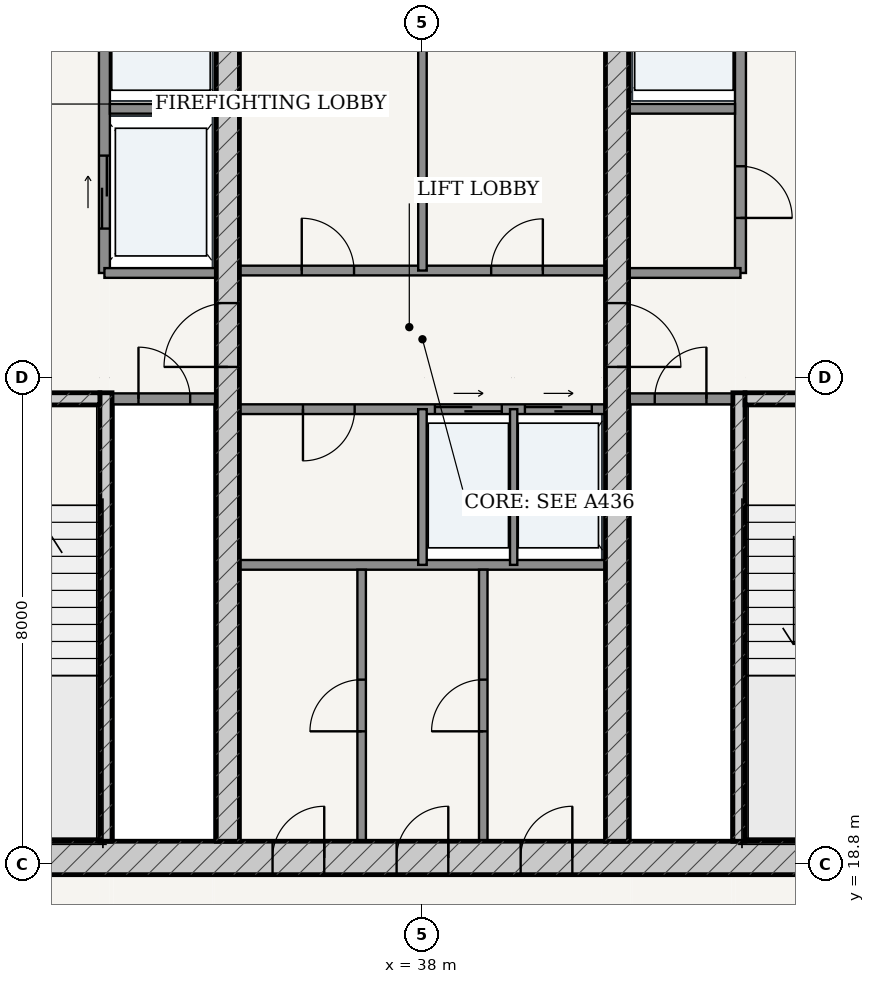
"""IFC4 building model, lengths in metres.
Left out: names, types, materials, properties, quantities, classifications, styles, units other than length and angle.
Written with IfcOpenShell. Run it as: python <this file> out.ifc"""

import sys

from ifc_helpers import new_model, si_unit, direction, frame, frame_2d, origin, place, context, subcontext, project, spatial, rectangle, extrude, source, transform, mapped, element, fill, save


model = new_model("IFC4")
c1 = context("Model", 3, precision=1e-05, world=origin(), true_north=direction((-0.2419218956, 0.970295726276)))
c2 = subcontext(c1, "Body", "Model", "MODEL_VIEW")
j1 = project(units=[si_unit("LENGTHUNIT", "METRE"), si_unit("PLANEANGLEUNIT", "RADIAN")], contexts=[c1])
p1 = place(None, origin())
s1 = spatial("IfcSite", under=j1, at=p1, CompositionType="ELEMENT")
p2 = place(p1, origin())
s2 = spatial("IfcBuilding", under=s1, at=p2, CompositionType="ELEMENT")
p3 = place(p2, frame((0.0, 0.0, 270.7)))
s3 = spatial("IfcBuildingStorey", under=s2, at=p3, CompositionType="ELEMENT", Elevation=270.7)
p4 = place(p3, frame((28.825, 18.9, 0.0), z_axis=(0.0, 0.0, 1.0), x_axis=(1.0, 0.0, 0.0)))
e1 = element("IfcWall", 1, at=p4, inside=s3, PredefinedType="SHEAR", context=c2, shape_type="SweptSolid", body=[
    extrude(rectangle(XDim=18.35, YDim=0.55, at=frame_2d((9.175, 0.0))), origin(), (0.0, 0.0, 1.0), 3.49),
])
p5 = place(p4, frame((6.71, 0.0, 0.0)))
e2 = element("IfcOpeningElement", 2, at=p5, cuts=e1, PredefinedType="OPENING", context=c2, shape_type="SweptSolid", body=[
    extrude(rectangle(XDim=0.85, YDim=2.1, at=frame_2d((0.425, 1.05))), frame((0.0, 0.285, 0.0), z_axis=(0.0, -1.0, 0.0), x_axis=(1.0, 0.0, 0.0)), (0.0, 0.0, 1.0), 0.57),
])
p6 = place(p4, frame((8.75, 0.0, 0.0)))
e3 = element("IfcOpeningElement", 3, at=p6, cuts=e1, PredefinedType="OPENING", context=c2, shape_type="SweptSolid", body=[
    extrude(rectangle(XDim=0.85, YDim=2.1, at=frame_2d((0.425, 1.05))), frame((0.0, 0.285, 0.0), z_axis=(0.0, -1.0, 0.0), x_axis=(1.0, 0.0, 0.0)), (0.0, 0.0, 1.0), 0.57),
])
p7 = place(p4, frame((10.79, 0.0, 0.0)))
e4 = element("IfcOpeningElement", 4, at=p7, cuts=e1, PredefinedType="OPENING", context=c2, shape_type="SweptSolid", body=[
    extrude(rectangle(XDim=0.85, YDim=2.1, at=frame_2d((0.425, 1.05))), frame((0.0, 0.285, 0.0), z_axis=(0.0, -1.0, 0.0), x_axis=(1.0, 0.0, 0.0)), (0.0, 0.0, 1.0), 0.57),
])
p8 = place(p3, frame((32.795, 19.175, 0.0), z_axis=(0.0, 0.0, 1.0), x_axis=(0.0, 1.0, 0.0)))
e5 = element("IfcWall", 5, at=p8, inside=s3, PredefinedType="SOLIDWALL", context=c2, shape_type="SweptSolid", body=[
    extrude(rectangle(XDim=7.375, YDim=0.2, at=frame_2d((3.688, 0.0))), origin(), (0.0, 0.0, 1.0), 3.49),
])
p9 = place(p3, frame((29.375, 26.45, 0.0), z_axis=(0.0, 0.0, 1.0), x_axis=(1.0, 0.0, 0.0)))
e6 = element("IfcWall", 6, at=p9, inside=s3, PredefinedType="SOLIDWALL", context=c2, shape_type="SweptSolid", body=[
    extrude(rectangle(XDim=3.32, YDim=0.2, at=frame_2d((1.66, 0.0))), origin(), (0.0, 0.0, 1.0), 3.49),
])
p10 = place(p9, frame((1.185, 0.0, 0.0)))
e7 = element("IfcOpeningElement", 7, at=p10, cuts=e6, PredefinedType="OPENING", context=c2, shape_type="SweptSolid", body=[
    extrude(rectangle(XDim=0.95, YDim=2.15, at=frame_2d((0.475, 1.075))), frame((0.0, 0.11, 0.0), z_axis=(0.0, -1.0, 0.0), x_axis=(1.0, 0.0, 0.0)), (0.0, 0.0, 1.0), 0.22),
])
p11 = place(p3, frame((43.205, 19.175, 0.0), z_axis=(0.0, 0.0, 1.0), x_axis=(0.0, 1.0, 0.0)))
e8 = element("IfcWall", 8, at=p11, inside=s3, PredefinedType="SOLIDWALL", context=c2, shape_type="SweptSolid", body=[
    extrude(rectangle(XDim=7.375, YDim=0.2, at=frame_2d((3.688, 0.0))), origin(), (0.0, 0.0, 1.0), 3.49),
])
p12 = place(p3, frame((43.305, 26.45, 0.0), z_axis=(0.0, 0.0, 1.0), x_axis=(1.0, 0.0, 0.0)))
e9 = element("IfcWall", 9, at=p12, inside=s3, PredefinedType="SOLIDWALL", context=c2, shape_type="SweptSolid", body=[
    extrude(rectangle(XDim=3.32, YDim=0.2, at=frame_2d((1.66, 0.0))), origin(), (0.0, 0.0, 1.0), 3.49),
])
p13 = place(p12, frame((1.185, 0.0, 0.0)))
e10 = element("IfcOpeningElement", 10, at=p13, cuts=e9, PredefinedType="OPENING", context=c2, shape_type="SweptSolid", body=[
    extrude(rectangle(XDim=0.95, YDim=2.15, at=frame_2d((0.475, 1.075))), frame((0.0, 0.11, 0.0), z_axis=(0.0, -1.0, 0.0), x_axis=(1.0, 0.0, 0.0)), (0.0, 0.0, 1.0), 0.22),
])
p14 = place(p3, frame((34.8, 19.175, 0.0), z_axis=(0.0, 0.0, 1.0), x_axis=(0.0, 1.0, 0.0)))
e11 = element("IfcWall", 11, at=p14, inside=s3, PredefinedType="SHEAR", context=c2, shape_type="SweptSolid", body=[
    extrude(rectangle(XDim=15.25, YDim=0.38, at=frame_2d((7.625, 0.0))), origin(), (0.0, 0.0, 1.0), 3.49),
])
p15 = place(p14, frame((7.8, 0.0, 0.0)))
e12 = element("IfcOpeningElement", 12, at=p15, cuts=e11, PredefinedType="OPENING", context=c2, shape_type="SweptSolid", body=[
    extrude(rectangle(XDim=1.05, YDim=2.15, at=frame_2d((0.525, 1.075))), frame((0.0, 0.2, 0.0), z_axis=(0.0, -1.0, 0.0), x_axis=(1.0, 0.0, 0.0)), (0.0, 0.0, 1.0), 0.4),
])
p16 = place(p3, frame((41.2, 19.175, 0.0), z_axis=(0.0, 0.0, 1.0), x_axis=(0.0, 1.0, 0.0)))
e13 = element("IfcWall", 13, at=p16, inside=s3, PredefinedType="SHEAR", context=c2, shape_type="SweptSolid", body=[
    extrude(rectangle(XDim=15.25, YDim=0.38, at=frame_2d((7.625, 0.0))), origin(), (0.0, 0.0, 1.0), 3.49),
])
p17 = place(p16, frame((7.8, 0.0, 0.0)))
e14 = element("IfcOpeningElement", 14, at=p17, cuts=e13, PredefinedType="OPENING", context=c2, shape_type="SweptSolid", body=[
    extrude(rectangle(XDim=1.05, YDim=2.15, at=frame_2d((0.525, 1.075))), frame((0.0, 0.2, 0.0), z_axis=(0.0, -1.0, 0.0), x_axis=(1.0, 0.0, 0.0)), (0.0, 0.0, 1.0), 0.4),
])
p18 = place(p3, frame((32.9, 26.45, 0.0), z_axis=(0.0, 0.0, 1.0), x_axis=(1.0, 0.0, 0.0)))
e15 = element("IfcWall", 15, at=p18, inside=s3, PredefinedType="PARTITIONING", context=c2, shape_type="SweptSolid", body=[
    extrude(rectangle(XDim=1.71, YDim=0.18, at=frame_2d((0.855, 0.0))), origin(), (0.0, 0.0, 1.0), 3.49),
])
p19 = place(p18, frame((0.43, 0.0, 0.0)))
e16 = element("IfcOpeningElement", 16, at=p19, cuts=e15, PredefinedType="OPENING", context=c2, shape_type="SweptSolid", body=[
    extrude(rectangle(XDim=0.85, YDim=2.1, at=frame_2d((0.425, 1.05))), frame((0.0, 0.1, 0.0), z_axis=(0.0, -1.0, 0.0), x_axis=(1.0, 0.0, 0.0)), (0.0, 0.0, 1.0), 0.2),
])
p20 = place(p3, frame((41.39, 26.45, 0.0), z_axis=(0.0, 0.0, 1.0), x_axis=(1.0, 0.0, 0.0)))
e17 = element("IfcWall", 17, at=p20, inside=s3, PredefinedType="PARTITIONING", context=c2, shape_type="SweptSolid", body=[
    extrude(rectangle(XDim=1.71, YDim=0.18, at=frame_2d((0.855, 0.0))), origin(), (0.0, 0.0, 1.0), 3.49),
])
p21 = place(p20, frame((0.43, 0.0, 0.0)))
e18 = element("IfcOpeningElement", 18, at=p21, cuts=e17, PredefinedType="OPENING", context=c2, shape_type="SweptSolid", body=[
    extrude(rectangle(XDim=0.85, YDim=2.1, at=frame_2d((0.425, 1.05))), frame((0.0, 0.1, 0.0), z_axis=(0.0, -1.0, 0.0), x_axis=(1.0, 0.0, 0.0)), (0.0, 0.0, 1.0), 0.2),
])
p22 = place(p3, frame((32.77, 28.52, 0.0), z_axis=(0.0, 0.0, 1.0), x_axis=(0.0, 1.0, 0.0)))
e19 = element("IfcWall", 19, at=p22, inside=s3, PredefinedType="PARTITIONING", context=c2, shape_type="SweptSolid", body=[
    extrude(rectangle(XDim=5.905, YDim=0.18, at=frame_2d((2.953, 0.0))), origin(), (0.0, 0.0, 1.0), 3.49),
])
p23 = place(p22, frame((3.655, 0.0, 0.0)))
e20 = element("IfcOpeningElement", 20, at=p23, cuts=e19, PredefinedType="OPENING", context=c2, shape_type="SweptSolid", body=[
    extrude(rectangle(XDim=1.15, YDim=2.2, at=frame_2d((0.575, 1.1))), frame((0.0, 0.1, 0.0), z_axis=(0.0, -1.0, 0.0), x_axis=(1.0, 0.0, 0.0)), (0.0, 0.0, 1.0), 0.2),
])
p24 = place(p22, frame((0.73, 0.0, 0.0)))
e21 = element("IfcOpeningElement", 21, at=p24, cuts=e19, PredefinedType="OPENING", context=c2, shape_type="SweptSolid", body=[
    extrude(rectangle(XDim=1.2, YDim=2.25, at=frame_2d((0.6, 1.125))), frame((0.0, 0.1, 0.0), z_axis=(0.0, -1.0, 0.0), x_axis=(1.0, 0.0, 0.0)), (0.0, 0.0, 1.0), 0.2),
])
p25 = place(p3, frame((32.86, 31.22, 0.0), z_axis=(0.0, 0.0, 1.0), x_axis=(1.0, 0.0, 0.0)))
e22 = element("IfcWall", 22, at=p25, inside=s3, PredefinedType="PARTITIONING", context=c2, shape_type="SweptSolid", body=[
    extrude(rectangle(XDim=1.75, YDim=0.16, at=frame_2d((0.875, 0.0))), origin(), (0.0, 0.0, 1.0), 3.49),
])
p26 = place(p3, frame((32.77, 28.52, 0.0), z_axis=(0.0, 0.0, 1.0), x_axis=(1.0, 0.0, 0.0)))
e23 = element("IfcWall", 23, at=p26, inside=s3, PredefinedType="PARTITIONING", context=c2, shape_type="SweptSolid", body=[
    extrude(rectangle(XDim=1.84, YDim=0.16, at=frame_2d((0.92, 0.0))), origin(), (0.0, 0.0, 1.0), 3.49),
])
p27 = place(p3, frame((43.23, 28.52, 0.0), z_axis=(0.0, 0.0, 1.0), x_axis=(0.0, 1.0, 0.0)))
e24 = element("IfcWall", 24, at=p27, inside=s3, PredefinedType="PARTITIONING", context=c2, shape_type="SweptSolid", body=[
    extrude(rectangle(XDim=5.905, YDim=0.18, at=frame_2d((2.953, 0.0))), origin(), (0.0, 0.0, 1.0), 3.49),
])
p28 = place(p27, frame((0.905, 0.0, 0.0)))
e25 = element("IfcOpeningElement", 25, at=p28, cuts=e24, PredefinedType="OPENING", context=c2, shape_type="SweptSolid", body=[
    extrude(rectangle(XDim=0.85, YDim=2.1, at=frame_2d((0.425, 1.05))), frame((0.0, 0.1, 0.0), z_axis=(0.0, -1.0, 0.0), x_axis=(1.0, 0.0, 0.0)), (0.0, 0.0, 1.0), 0.2),
])
p29 = place(p27, frame((3.655, 0.0, 0.0)))
e26 = element("IfcOpeningElement", 26, at=p29, cuts=e24, PredefinedType="OPENING", context=c2, shape_type="SweptSolid", body=[
    extrude(rectangle(XDim=1.15, YDim=2.2, at=frame_2d((0.575, 1.1))), frame((0.0, 0.1, 0.0), z_axis=(0.0, -1.0, 0.0), x_axis=(1.0, 0.0, 0.0)), (0.0, 0.0, 1.0), 0.2),
])
p30 = place(p3, frame((41.39, 31.22, 0.0), z_axis=(0.0, 0.0, 1.0), x_axis=(1.0, 0.0, 0.0)))
e27 = element("IfcWall", 27, at=p30, inside=s3, PredefinedType="PARTITIONING", context=c2, shape_type="SweptSolid", body=[
    extrude(rectangle(XDim=1.75, YDim=0.16, at=frame_2d((0.875, 0.0))), origin(), (0.0, 0.0, 1.0), 3.49),
])
p31 = place(p3, frame((41.39, 28.52, 0.0), z_axis=(0.0, 0.0, 1.0), x_axis=(1.0, 0.0, 0.0)))
e28 = element("IfcWall", 28, at=p31, inside=s3, PredefinedType="PARTITIONING", context=c2, shape_type="SweptSolid", body=[
    extrude(rectangle(XDim=1.84, YDim=0.16, at=frame_2d((0.92, 0.0))), origin(), (0.0, 0.0, 1.0), 3.49),
])
p32 = place(p3, frame((34.99, 28.56, 0.0), z_axis=(0.0, 0.0, 1.0), x_axis=(1.0, 0.0, 0.0)))
e29 = element("IfcWall", 29, at=p32, inside=s3, PredefinedType="PARTITIONING", context=c2, shape_type="SweptSolid", body=[
    extrude(rectangle(XDim=6.02, YDim=0.16, at=frame_2d((3.01, 0.0))), origin(), (0.0, 0.0, 1.0), 3.49),
])
p33 = place(p32, frame((1.025, 0.0, 0.0)))
e30 = element("IfcOpeningElement", 30, at=p33, cuts=e29, PredefinedType="OPENING", context=c2, shape_type="SweptSolid", body=[
    extrude(rectangle(XDim=0.86, YDim=2.1, at=frame_2d((0.43, 1.05))), frame((0.0, 0.09, 0.0), z_axis=(0.0, -1.0, 0.0), x_axis=(1.0, 0.0, 0.0)), (0.0, 0.0, 1.0), 0.18),
])
p34 = place(p32, frame((4.14, 0.0, 0.0)))
e31 = element("IfcOpeningElement", 31, at=p34, cuts=e29, PredefinedType="OPENING", context=c2, shape_type="SweptSolid", body=[
    extrude(rectangle(XDim=0.85, YDim=2.1, at=frame_2d((0.425, 1.05))), frame((0.0, 0.09, 0.0), z_axis=(0.0, -1.0, 0.0), x_axis=(1.0, 0.0, 0.0)), (0.0, 0.0, 1.0), 0.18),
])
p35 = place(p3, frame((38.0, 28.56, 0.0), z_axis=(0.0, 0.0, 1.0), x_axis=(0.0, 1.0, 0.0)))
e32 = element("IfcWall", 32, at=p35, inside=s3, PredefinedType="PARTITIONING", context=c2, shape_type="SweptSolid", body=[
    extrude(rectangle(XDim=5.865, YDim=0.14, at=frame_2d((2.933, 0.0))), origin(), (0.0, 0.0, 1.0), 3.49),
])
p36 = place(p3, frame((34.99, 26.28, 0.0), z_axis=(0.0, 0.0, 1.0), x_axis=(1.0, 0.0, 0.0)))
e33 = element("IfcWall", 33, at=p36, inside=s3, PredefinedType="PARTITIONING", context=c2, shape_type="SweptSolid", body=[
    extrude(rectangle(XDim=6.02, YDim=0.16, at=frame_2d((3.01, 0.0))), origin(), (0.0, 0.0, 1.0), 3.49),
])
p37 = place(p36, frame((1.045, 0.0, 0.0)))
e34 = element("IfcOpeningElement", 34, at=p37, cuts=e33, PredefinedType="OPENING", context=c2, shape_type="SweptSolid", body=[
    extrude(rectangle(XDim=0.85, YDim=2.1, at=frame_2d((0.425, 1.05))), frame((0.0, 0.09, 0.0), z_axis=(0.0, -1.0, 0.0), x_axis=(1.0, 0.0, 0.0)), (0.0, 0.0, 1.0), 0.18),
])
p38 = place(p36, frame((3.215, 0.0, 0.0)))
e35 = element("IfcOpeningElement", 35, at=p38, cuts=e33, PredefinedType="OPENING", context=c2, shape_type="SweptSolid", body=[
    extrude(rectangle(XDim=1.1, YDim=2.2, at=frame_2d((0.55, 1.1))), frame((0.0, 0.09, 0.0), z_axis=(0.0, -1.0, 0.0), x_axis=(1.0, 0.0, 0.0)), (0.0, 0.0, 1.0), 0.18),
])
p39 = place(p36, frame((4.695, 0.0, 0.0)))
e36 = element("IfcOpeningElement", 36, at=p39, cuts=e33, PredefinedType="OPENING", context=c2, shape_type="SweptSolid", body=[
    extrude(rectangle(XDim=1.1, YDim=2.2, at=frame_2d((0.55, 1.1))), frame((0.0, 0.09, 0.0), z_axis=(0.0, -1.0, 0.0), x_axis=(1.0, 0.0, 0.0)), (0.0, 0.0, 1.0), 0.18),
])
p40 = place(p3, frame((34.99, 23.72, 0.0), z_axis=(0.0, 0.0, 1.0), x_axis=(1.0, 0.0, 0.0)))
e37 = element("IfcWall", 37, at=p40, inside=s3, PredefinedType="PARTITIONING", context=c2, shape_type="SweptSolid", body=[
    extrude(rectangle(XDim=6.02, YDim=0.16, at=frame_2d((3.01, 0.0))), origin(), (0.0, 0.0, 1.0), 3.49),
])
p41 = place(p3, frame((38.0, 23.72, 0.0), z_axis=(0.0, 0.0, 1.0), x_axis=(0.0, 1.0, 0.0)))
e38 = element("IfcWall", 38, at=p41, inside=s3, PredefinedType="PARTITIONING", context=c2, shape_type="SweptSolid", body=[
    extrude(rectangle(XDim=2.56, YDim=0.14, at=frame_2d((1.28, 0.0))), origin(), (0.0, 0.0, 1.0), 3.49),
])
p42 = place(p3, frame((39.5, 23.72, 0.0), z_axis=(0.0, 0.0, 1.0), x_axis=(0.0, 1.0, 0.0)))
e39 = element("IfcWall", 39, at=p42, inside=s3, PredefinedType="PARTITIONING", context=c2, shape_type="SweptSolid", body=[
    extrude(rectangle(XDim=2.56, YDim=0.12, at=frame_2d((1.28, 0.0))), origin(), (0.0, 0.0, 1.0), 3.49),
])
p43 = place(p3, frame((37.0, 19.175, 0.0), z_axis=(0.0, 0.0, 1.0), x_axis=(0.0, 1.0, 0.0)))
e40 = element("IfcWall", 40, at=p43, inside=s3, PredefinedType="PARTITIONING", context=c2, shape_type="SweptSolid", body=[
    extrude(rectangle(XDim=4.465, YDim=0.14, at=frame_2d((2.232, 0.0))), origin(), (0.0, 0.0, 1.0), 3.49),
])
p44 = place(p43, frame((1.808, 0.0, 0.0)))
e41 = element("IfcOpeningElement", 41, at=p44, cuts=e40, PredefinedType="OPENING", context=c2, shape_type="SweptSolid", body=[
    extrude(rectangle(XDim=0.85, YDim=2.1, at=frame_2d((0.425, 1.05))), frame((0.0, 0.08, 0.0), z_axis=(0.0, -1.0, 0.0), x_axis=(1.0, 0.0, 0.0)), (0.0, 0.0, 1.0), 0.16),
])
p45 = place(p3, frame((39.0, 19.175, 0.0), z_axis=(0.0, 0.0, 1.0), x_axis=(0.0, 1.0, 0.0)))
e42 = element("IfcWall", 42, at=p45, inside=s3, PredefinedType="PARTITIONING", context=c2, shape_type="SweptSolid", body=[
    extrude(rectangle(XDim=4.465, YDim=0.14, at=frame_2d((2.232, 0.0))), origin(), (0.0, 0.0, 1.0), 3.49),
])
p46 = place(p45, frame((1.808, 0.0, 0.0)))
e43 = element("IfcOpeningElement", 43, at=p46, cuts=e42, PredefinedType="OPENING", context=c2, shape_type="SweptSolid", body=[
    extrude(rectangle(XDim=0.85, YDim=2.1, at=frame_2d((0.425, 1.05))), frame((0.0, 0.08, 0.0), z_axis=(0.0, -1.0, 0.0), x_axis=(1.0, 0.0, 0.0)), (0.0, 0.0, 1.0), 0.16),
])
m1 = source(origin(), c2, "Body", "SweptSolid", [
    extrude(rectangle(XDim=1.05, YDim=2.15, at=frame_2d((0.525, 1.075))), frame((0.0, 0.025, 0.0), z_axis=(0.0, -1.0, 0.0), x_axis=(1.0, 0.0, 0.0)), (0.0, 0.0, 1.0), 0.05),
])
p47 = place(p15, origin())
e44 = element("IfcDoor", 44, at=p47, inside=s3, OperationType="SINGLE_SWING_LEFT", PredefinedType="DOOR", context=c2, shape_type="MappedRepresentation", body=[
    mapped(m1, transform((0.0, 0.0, 0.0), scale=1.0)),
])
fill(e12, e44)
p48 = place(p17, frame((1.05, 0.0, 0.0), z_axis=(0.0, 0.0, 1.0), x_axis=(-1.0, 0.0, 0.0)))
e45 = element("IfcDoor", 45, at=p48, inside=s3, OperationType="SINGLE_SWING_RIGHT", PredefinedType="DOOR", context=c2, shape_type="MappedRepresentation", body=[
    mapped(m1, transform((0.0, 0.0, 0.0), scale=1.0)),
])
fill(e14, e45)
m2 = source(origin(), c2, "Body", "SweptSolid", [
    extrude(rectangle(XDim=0.85, YDim=2.1, at=frame_2d((0.425, 1.05))), frame((0.0, 0.025, 0.0), z_axis=(0.0, -1.0, 0.0), x_axis=(1.0, 0.0, 0.0)), (0.0, 0.0, 1.0), 0.05),
])
p49 = place(p19, origin())
e46 = element("IfcDoor", 46, at=p49, inside=s3, OperationType="SINGLE_SWING_LEFT", PredefinedType="DOOR", context=c2, shape_type="MappedRepresentation", body=[
    mapped(m2, transform((0.0, 0.0, 0.0), scale=1.0)),
])
fill(e16, e46)
p50 = place(p21, origin())
e47 = element("IfcDoor", 47, at=p50, inside=s3, OperationType="SINGLE_SWING_RIGHT", PredefinedType="DOOR", context=c2, shape_type="MappedRepresentation", body=[
    mapped(m2, transform((0.0, 0.0, 0.0), scale=1.0)),
])
fill(e18, e47)
p51 = place(p28, frame((0.85, 0.0, 0.0), z_axis=(0.0, 0.0, 1.0), x_axis=(-1.0, 0.0, 0.0)))
e48 = element("IfcDoor", 48, at=p51, inside=s3, OperationType="SINGLE_SWING_RIGHT", PredefinedType="DOOR", context=c2, shape_type="MappedRepresentation", body=[
    mapped(m2, transform((0.0, 0.0, 0.0), scale=1.0)),
])
fill(e25, e48)
m3 = source(origin(), c2, "Body", "SweptSolid", [
    extrude(rectangle(XDim=0.86, YDim=2.1, at=frame_2d((0.43, 1.05))), frame((0.0, 0.025, 0.0), z_axis=(0.0, -1.0, 0.0), x_axis=(1.0, 0.0, 0.0)), (0.0, 0.0, 1.0), 0.05),
])
p52 = place(p33, origin())
e49 = element("IfcDoor", 49, at=p52, inside=s3, OperationType="SINGLE_SWING_LEFT", PredefinedType="DOOR", context=c2, shape_type="MappedRepresentation", body=[
    mapped(m3, transform((0.0, 0.0, 0.0), scale=1.0)),
])
fill(e30, e49)
p53 = place(p34, origin())
e50 = element("IfcDoor", 50, at=p53, inside=s3, OperationType="SINGLE_SWING_RIGHT", PredefinedType="DOOR", context=c2, shape_type="MappedRepresentation", body=[
    mapped(m2, transform((0.0, 0.0, 0.0), scale=1.0)),
])
fill(e31, e50)
p54 = place(p37, frame((0.85, 0.0, 0.0), z_axis=(0.0, 0.0, 1.0), x_axis=(-1.0, 0.0, 0.0)))
e51 = element("IfcDoor", 51, at=p54, inside=s3, OperationType="SINGLE_SWING_RIGHT", PredefinedType="DOOR", context=c2, shape_type="MappedRepresentation", body=[
    mapped(m2, transform((0.0, 0.0, 0.0), scale=1.0)),
])
fill(e34, e51)
p55 = place(p5, origin())
e52 = element("IfcDoor", 52, at=p55, inside=s3, OperationType="SINGLE_SWING_RIGHT", PredefinedType="DOOR", context=c2, shape_type="MappedRepresentation", body=[
    mapped(m2, transform((0.0, 0.0, 0.0), scale=1.0)),
])
fill(e2, e52)
p56 = place(p6, origin())
e53 = element("IfcDoor", 53, at=p56, inside=s3, OperationType="SINGLE_SWING_RIGHT", PredefinedType="DOOR", context=c2, shape_type="MappedRepresentation", body=[
    mapped(m2, transform((0.0, 0.0, 0.0), scale=1.0)),
])
fill(e3, e53)
p57 = place(p7, origin())
e54 = element("IfcDoor", 54, at=p57, inside=s3, OperationType="SINGLE_SWING_RIGHT", PredefinedType="DOOR", context=c2, shape_type="MappedRepresentation", body=[
    mapped(m2, transform((0.0, 0.0, 0.0), scale=1.0)),
])
fill(e4, e54)
p58 = place(p44, origin())
e55 = element("IfcDoor", 55, at=p58, inside=s3, OperationType="SINGLE_SWING_LEFT", PredefinedType="DOOR", context=c2, shape_type="MappedRepresentation", body=[
    mapped(m2, transform((0.0, 0.0, 0.0), scale=1.0)),
])
fill(e41, e55)
p59 = place(p46, origin())
e56 = element("IfcDoor", 56, at=p59, inside=s3, OperationType="SINGLE_SWING_LEFT", PredefinedType="DOOR", context=c2, shape_type="MappedRepresentation", body=[
    mapped(m2, transform((0.0, 0.0, 0.0), scale=1.0)),
])
fill(e43, e56)
m4 = source(origin(), c2, "Body", "SweptSolid", [
    extrude(rectangle(XDim=1.2, YDim=2.25, at=frame_2d((0.6, 1.125))), frame((0.0, 0.025, 0.0), z_axis=(0.0, -1.0, 0.0), x_axis=(1.0, 0.0, 0.0)), (0.0, 0.0, 1.0), 0.05),
])
p60 = place(p24, origin())
e57 = element("IfcDoor", 57, at=p60, inside=s3, OperationType="DOUBLE_DOOR_SLIDING", PredefinedType="DOOR", context=c2, shape_type="MappedRepresentation", body=[
    mapped(m4, transform((0.0, 0.0, 0.0), scale=1.0)),
])
fill(e21, e57)
m5 = source(origin(), c2, "Body", "SweptSolid", [
    extrude(rectangle(XDim=1.1, YDim=2.2, at=frame_2d((0.55, 1.1))), frame((0.0, 0.025, 0.0), z_axis=(0.0, -1.0, 0.0), x_axis=(1.0, 0.0, 0.0)), (0.0, 0.0, 1.0), 0.05),
])
p61 = place(p38, origin())
e58 = element("IfcDoor", 58, at=p61, inside=s3, OperationType="DOUBLE_DOOR_SLIDING", PredefinedType="DOOR", context=c2, shape_type="MappedRepresentation", body=[
    mapped(m5, transform((0.0, 0.0, 0.0), scale=1.0)),
])
fill(e35, e58)
p62 = place(p39, origin())
e59 = element("IfcDoor", 59, at=p62, inside=s3, OperationType="DOUBLE_DOOR_SLIDING", PredefinedType="DOOR", context=c2, shape_type="MappedRepresentation", body=[
    mapped(m5, transform((0.0, 0.0, 0.0), scale=1.0)),
])
fill(e36, e59)
save(model, sys.argv[1])
